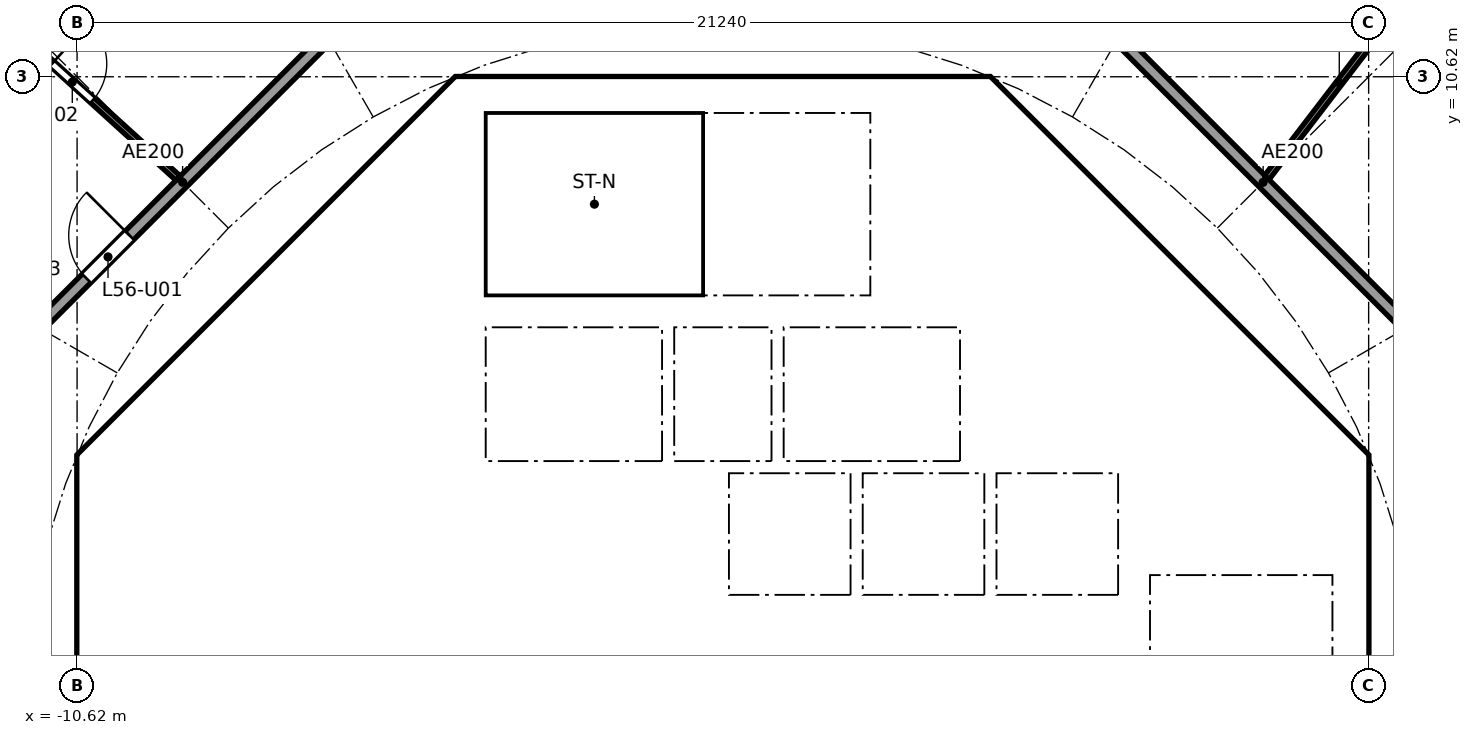
"""IFC4 building model, lengths in metres.
Left out: names, types, materials, properties, quantities, classifications, styles, units other than length and angle.
Written with IfcOpenShell. Run it as: python <this file> out.ifc"""

import sys

from ifc_helpers import new_model, si_unit, direction, frame, frame_2d, origin, place, context, subcontext, project, spatial, polyline, rectangle, outline, extrude, element, fill, save


model = new_model("IFC4")
c1 = context("Model", 3, precision=1e-05, world=origin(), true_north=direction((0.0, 1.0)))
c2 = subcontext(c1, "Body", "Model", "MODEL_VIEW")
j1 = project(units=[si_unit("LENGTHUNIT", "METRE"), si_unit("PLANEANGLEUNIT", "RADIAN")], contexts=[c1])
p1 = place(None, origin())
s1 = spatial("IfcSite", under=j1, at=p1, CompositionType="ELEMENT")
p2 = place(p1, origin())
s2 = spatial("IfcBuilding", under=s1, at=p2, CompositionType="ELEMENT")
p3 = place(p2, frame((0.0, 0.0, 223.3)))
s3 = spatial("IfcBuildingStorey", under=s2, at=p3, CompositionType="ELEMENT", Elevation=223.3)
p4 = place(p3, frame((9.988, 4.613, 0.0), z_axis=(0.0, 0.0, 1.0), x_axis=(-0.707106781187, 0.707106781187, 0.0)))
e1 = element("IfcWall", 1, at=p4, inside=s3, PredefinedType="SHEAR", context=c2, shape_type="SweptSolid", body=[
    extrude(rectangle(XDim=7.602, YDim=0.6, at=frame_2d((3.801, 0.0))), origin(), (0.0, 0.0, 1.0), 3.44),
])
p5 = place(p4, frame((3.201, 0.0, 0.0)))
e2 = element("IfcOpeningElement", 2, at=p5, cuts=e1, PredefinedType="OPENING", context=c2, shape_type="SweptSolid", body=[
    extrude(rectangle(XDim=1.2, YDim=2.1, at=frame_2d((0.6, 1.05))), frame((0.0, 0.31, 0.0), z_axis=(0.0, -1.0, 0.0), x_axis=(1.0, 0.0, 0.0)), (0.0, 0.0, 1.0), 0.62),
])
p6 = place(p3, frame((-4.613, 9.988, 0.0), z_axis=(0.0, 0.0, 1.0), x_axis=(-0.707106781187, -0.707106781187, 0.0)))
e3 = element("IfcWall", 3, at=p6, inside=s3, PredefinedType="SHEAR", context=c2, shape_type="SweptSolid", body=[
    extrude(rectangle(XDim=7.602, YDim=0.6, at=frame_2d((3.801, 0.0))), origin(), (0.0, 0.0, 1.0), 3.44),
])
p7 = place(p6, frame((0.351, 0.0, 0.0)))
e4 = element("IfcOpeningElement", 4, at=p7, cuts=e3, PredefinedType="OPENING", context=c2, shape_type="SweptSolid", body=[
    extrude(rectangle(XDim=1.1, YDim=2.1, at=frame_2d((0.55, 1.05))), frame((0.0, 0.31, 0.0), z_axis=(0.0, -1.0, 0.0), x_axis=(1.0, 0.0, 0.0)), (0.0, 0.0, 1.0), 0.62),
])
p8 = place(p3, frame((-10.325, 3.801, 0.0), z_axis=(0.0, 0.0, 1.0), x_axis=(0.0, -1.0, 0.0)))
e5 = element("IfcWall", 5, at=p8, inside=s3, PredefinedType="SHEAR", context=c2, shape_type="SweptSolid", body=[
    extrude(rectangle(XDim=7.602, YDim=0.6, at=frame_2d((3.801, 0.0))), origin(), (0.0, 0.0, 1.0), 3.44),
])
p9 = place(p8, frame((0.651, 0.0, 0.0)))
e6 = element("IfcOpeningElement", 6, at=p9, cuts=e5, PredefinedType="OPENING", context=c2, shape_type="SweptSolid", body=[
    extrude(rectangle(XDim=1.5, YDim=2.1, at=frame_2d((0.75, 1.05))), frame((0.0, 0.31, 0.0), z_axis=(0.0, -1.0, 0.0), x_axis=(1.0, 0.0, 0.0)), (0.0, 0.0, 1.0), 0.62),
])
p10 = place(p8, frame((5.451, 0.0, 0.0)))
e7 = element("IfcOpeningElement", 7, at=p10, cuts=e5, PredefinedType="OPENING", context=c2, shape_type="SweptSolid", body=[
    extrude(rectangle(XDim=1.5, YDim=2.1, at=frame_2d((0.75, 1.05))), frame((0.0, 0.31, 0.0), z_axis=(0.0, -1.0, 0.0), x_axis=(1.0, 0.0, 0.0)), (0.0, 0.0, 1.0), 0.62),
])
p11 = place(p3, frame((-6.2, 4.3, 0.0), z_axis=(0.0, 0.0, 1.0), x_axis=(0.0, 1.0, 0.0)))
e8 = element("IfcWall", 8, at=p11, inside=s3, PredefinedType="PARTITIONING", context=c2, shape_type="SweptSolid", body=[
    extrude(rectangle(XDim=3.527, YDim=0.15, at=frame_2d((1.763, 0.0))), origin(), (0.0, 0.0, 1.0), 3.44),
])
p12 = place(p11, frame((0.262, 0.0, 0.0)))
e9 = element("IfcOpeningElement", 9, at=p12, cuts=e8, PredefinedType="OPENING", context=c2, shape_type="SweptSolid", body=[
    extrude(rectangle(XDim=0.9, YDim=2.1, at=frame_2d((0.45, 1.05))), frame((0.0, 0.085, 0.0), z_axis=(0.0, -1.0, 0.0), x_axis=(1.0, 0.0, 0.0)), (0.0, 0.0, 1.0), 0.17),
])
p13 = place(p11, frame((2.138, 0.0, 0.0)))
e10 = element("IfcOpeningElement", 10, at=p13, cuts=e8, PredefinedType="OPENING", context=c2, shape_type="SweptSolid", body=[
    extrude(rectangle(XDim=0.9, YDim=2.1, at=frame_2d((0.45, 1.05))), frame((0.0, 0.085, 0.0), z_axis=(0.0, -1.0, 0.0), x_axis=(1.0, 0.0, 0.0)), (0.0, 0.0, 1.0), 0.17),
])
p14 = place(p3, frame((4.0, 4.3, 0.0), z_axis=(0.0, 0.0, 1.0), x_axis=(0.0, 1.0, 0.0)))
e11 = element("IfcWall", 11, at=p14, inside=s3, PredefinedType="SOLIDWALL", context=c2, shape_type="SweptSolid", body=[
    extrude(rectangle(XDim=2.2, YDim=0.2, at=frame_2d((1.1, 0.0))), origin(), (0.0, 0.0, 1.0), 3.44),
])
p15 = place(p14, frame((0.55, 0.0, 0.0)))
e12 = element("IfcOpeningElement", 12, at=p15, cuts=e11, PredefinedType="OPENING", context=c2, shape_type="SweptSolid", body=[
    extrude(rectangle(XDim=1.1, YDim=2.1, at=frame_2d((0.55, 1.05))), frame((0.0, 0.11, 0.0), z_axis=(0.0, -1.0, 0.0), x_axis=(1.0, 0.0, 0.0)), (0.0, 0.0, 1.0), 0.22),
])
p16 = place(p3, frame((-4.0, 4.3, 0.0), z_axis=(0.0, 0.0, 1.0), x_axis=(0.0, 1.0, 0.0)))
e13 = element("IfcWall", 13, at=p16, inside=s3, PredefinedType="SOLIDWALL", context=c2, shape_type="SweptSolid", body=[
    extrude(rectangle(XDim=2.2, YDim=0.2, at=frame_2d((1.1, 0.0))), origin(), (0.0, 0.0, 1.0), 3.44),
])
p17 = place(p16, frame((0.55, 0.0, 0.0)))
e14 = element("IfcOpeningElement", 14, at=p17, cuts=e13, PredefinedType="OPENING", context=c2, shape_type="SweptSolid", body=[
    extrude(rectangle(XDim=1.1, YDim=2.1, at=frame_2d((0.55, 1.05))), frame((0.0, 0.11, 0.0), z_axis=(0.0, -1.0, 0.0), x_axis=(1.0, 0.0, 0.0)), (0.0, 0.0, 1.0), 0.22),
])
p18 = place(p3, frame((-6.7, 2.0, 0.0), z_axis=(0.0, 0.0, 1.0), x_axis=(1.0, 0.0, 0.0)))
e15 = element("IfcWall", 15, at=p18, inside=s3, PredefinedType="SOLIDWALL", context=c2, shape_type="SweptSolid", body=[
    extrude(rectangle(XDim=13.4, YDim=0.2, at=frame_2d((6.7, 0.0))), origin(), (0.0, 0.0, 1.0), 3.44),
])
p19 = place(p18, frame((7.25, 0.0, 0.0)))
e16 = element("IfcOpeningElement", 16, at=p19, cuts=e15, PredefinedType="OPENING", context=c2, shape_type="SweptSolid", body=[
    extrude(rectangle(XDim=1.1, YDim=2.1, at=frame_2d((0.55, 1.05))), frame((0.0, 0.11, 0.0), z_axis=(0.0, -1.0, 0.0), x_axis=(1.0, 0.0, 0.0)), (0.0, 0.0, 1.0), 0.22),
])
p20 = place(p18, frame((9.45, 0.0, 0.0)))
e17 = element("IfcOpeningElement", 17, at=p20, cuts=e15, PredefinedType="OPENING", context=c2, shape_type="SweptSolid", body=[
    extrude(rectangle(XDim=1.1, YDim=2.1, at=frame_2d((0.55, 1.05))), frame((0.0, 0.11, 0.0), z_axis=(0.0, -1.0, 0.0), x_axis=(1.0, 0.0, 0.0)), (0.0, 0.0, 1.0), 0.22),
])
p21 = place(p18, frame((1.85, 0.0, 0.0)))
e18 = element("IfcOpeningElement", 18, at=p21, cuts=e15, PredefinedType="OPENING", context=c2, shape_type="SweptSolid", body=[
    extrude(rectangle(XDim=0.9, YDim=2.1, at=frame_2d((0.45, 1.05))), frame((0.0, 0.11, 0.0), z_axis=(0.0, -1.0, 0.0), x_axis=(1.0, 0.0, 0.0)), (0.0, 0.0, 1.0), 0.22),
])
p22 = place(p18, frame((5.15, 0.0, 0.0)))
e19 = element("IfcOpeningElement", 19, at=p22, cuts=e15, PredefinedType="OPENING", context=c2, shape_type="SweptSolid", body=[
    extrude(rectangle(XDim=0.9, YDim=2.1, at=frame_2d((0.45, 1.05))), frame((0.0, 0.11, 0.0), z_axis=(0.0, -1.0, 0.0), x_axis=(1.0, 0.0, 0.0)), (0.0, 0.0, 1.0), 0.22),
])
p23 = place(p3, frame((6.7, 4.0, 0.0), z_axis=(0.0, 0.0, 1.0), x_axis=(1.0, 0.0, 0.0)))
e20 = element("IfcWall", 20, at=p23, inside=s3, PredefinedType="SOLIDWALL", context=c2, shape_type="SweptSolid", body=[
    extrude(rectangle(XDim=3.325, YDim=0.2, at=frame_2d((1.662, 0.0))), origin(), (0.0, 0.0, 1.0), 3.44),
])
p24 = place(p23, frame((1.25, 0.0, 0.0)))
e21 = element("IfcOpeningElement", 21, at=p24, cuts=e20, PredefinedType="OPENING", context=c2, shape_type="SweptSolid", body=[
    extrude(rectangle(XDim=1.1, YDim=2.1, at=frame_2d((0.55, 1.05))), frame((0.0, 0.11, 0.0), z_axis=(0.0, -1.0, 0.0), x_axis=(1.0, 0.0, 0.0)), (0.0, 0.0, 1.0), 0.22),
])
p25 = place(p3, frame((4.0, 7.025, 0.0), z_axis=(0.0, 0.0, 1.0), x_axis=(0.0, 1.0, 0.0)))
e22 = element("IfcWall", 22, at=p25, inside=s3, PredefinedType="SOLIDWALL", context=c2, shape_type="SweptSolid", body=[
    extrude(rectangle(XDim=3.0, YDim=0.2, at=frame_2d((1.5, 0.0))), origin(), (0.0, 0.0, 1.0), 3.44),
])
p26 = place(p25, frame((0.925, 0.0, 0.0)))
e23 = element("IfcOpeningElement", 23, at=p26, cuts=e22, PredefinedType="OPENING", context=c2, shape_type="SweptSolid", body=[
    extrude(rectangle(XDim=1.1, YDim=2.1, at=frame_2d((0.55, 1.05))), frame((0.0, 0.11, 0.0), z_axis=(0.0, -1.0, 0.0), x_axis=(1.0, 0.0, 0.0)), (0.0, 0.0, 1.0), 0.22),
])
p27 = place(p3, origin())
e24 = element("IfcWall", 24, at=p27, inside=s3, PredefinedType="SHEAR", context=c2, shape_type="SweptSolid", body=[
    extrude(outline(polyline([(-10.2, 4.825), (-9.776, 4.401), (-10.025, 4.152), (-10.025, 3.801), (-10.625, 3.801), (-10.625, 4.401), (-10.2, 4.825)])), origin(), (0.0, 0.0, 1.0), 3.44),
])
p28 = place(p3, origin())
e25 = element("IfcWall", 25, at=p28, inside=s3, PredefinedType="SHEAR", context=c2, shape_type="SweptSolid", body=[
    extrude(outline(polyline([(-4.152, 10.025), (-4.401, 9.776), (-4.825, 10.2), (-4.401, 10.625), (4.401, 10.625), (4.825, 10.2), (4.401, 9.776), (4.152, 10.025), (-4.152, 10.025)])), origin(), (0.0, 0.0, 1.0), 3.44),
])
p29 = place(p3, origin())
e26 = element("IfcWall", 26, at=p29, inside=s3, PredefinedType="SHEAR", context=c2, shape_type="SweptSolid", body=[
    extrude(outline(polyline([(9.776, -4.401), (10.025, -4.152), (10.025, -3.801), (10.025, 4.152), (9.776, 4.401), (10.2, 4.825), (10.625, 4.401), (10.625, -4.401), (10.2, -4.825), (9.776, -4.401)])), origin(), (0.0, 0.0, 1.0), 3.44),
])
p30 = place(p3, frame((-10.025, 4.0, 0.0), z_axis=(0.0, 0.0, 1.0), x_axis=(1.0, 0.0, 0.0)))
e27 = element("IfcWall", 27, at=p30, inside=s3, PredefinedType="PARTITIONING", context=c2, shape_type="SweptSolid", body=[
    extrude(rectangle(XDim=3.325, YDim=0.2, at=frame_2d((1.662, 0.0))), origin(), (0.0, 0.0, 1.0), 3.44),
])
p31 = place(p3, frame((-8.301, 5.8, 0.0), z_axis=(0.0, 0.0, 1.0), x_axis=(1.0, 0.0, 0.0)))
e28 = element("IfcWall", 28, at=p31, inside=s3, PredefinedType="PARTITIONING", context=c2, shape_type="SweptSolid", body=[
    extrude(rectangle(XDim=2.026, YDim=0.15, at=frame_2d((1.013, 0.0))), origin(), (0.0, 0.0, 1.0), 3.44),
])
for number, where, z_axis, x_axis in (
    (29, (-0.9, 4.3, 0.0), (0.0, 0.0, 1.0), (0.0, 1.0, 0.0)),
    (30, (0.9, 4.3, 0.0), (0.0, 0.0, 1.0), (0.0, 1.0, 0.0)),
):
    element("IfcWall", number, at=place(p3, frame(where, z_axis=z_axis, x_axis=x_axis)), inside=s3, PredefinedType="SOLIDWALL", context=c2, shape_type="SweptSolid", body=[
        extrude(rectangle(XDim=2.2, YDim=0.2, at=frame_2d((1.1, 0.0))), origin(), (0.0, 0.0, 1.0), 3.44),
    ])
p32 = place(p3, origin())
e31 = element("IfcWall", 31, at=p32, inside=s3, PredefinedType="SOLIDWALL", context=c2, shape_type="SweptSolid", body=[
    extrude(outline(polyline([(-6.7, 4.3), (6.7, 4.3), (6.7, 2.1), (6.5, 2.1), (6.5, 4.1), (4.5, 4.1), (4.5, 2.1), (4.3, 2.1), (4.3, 4.1), (2.3, 4.1), (2.3, 2.1), (2.1, 2.1), (2.1, 4.1), (0.1, 4.1), (0.1, 2.1), (-0.1, 2.1), (-0.1, 4.1), (-2.1, 4.1), (-2.1, 2.1), (-2.3, 2.1), (-2.3, 4.1), (-6.5, 4.1), (-6.5, 2.1), (-6.7, 2.1), (-6.7, 4.3)])), origin(), (0.0, 0.0, 1.0), 3.44),
])
p33 = place(p3, origin())
e32 = element("IfcWall", 32, at=p33, inside=s3, PredefinedType="SOLIDWALL", context=c2, shape_type="SweptSolid", body=[
    extrude(outline(polyline([(-3.9, 7.025), (-4.1, 7.025), (-4.1, 10.025), (-3.9, 10.025), (-3.9, 7.025)])), origin(), (0.0, 0.0, 1.0), 3.44),
])
p34 = place(p3, origin())
e33 = element("IfcWall", 33, at=p34, inside=s3, PredefinedType="SOLIDWALL", context=c2, shape_type="SweptSolid", body=[
    extrude(outline(polyline([(4.1, 6.5), (-4.1, 6.5), (-4.1, 7.025), (4.1, 7.025), (4.1, 6.5)])), origin(), (0.0, 0.0, 1.0), 3.44),
])
p35 = place(p3, origin())
e34 = element("IfcWall", 34, at=p35, inside=s3, PredefinedType="SOLIDWALL", context=c2, shape_type="SweptSolid", body=[
    extrude(outline(polyline([(7.025, -3.9), (6.7, -3.9), (6.7, 3.9), (7.025, 3.9), (7.025, -3.9)])), origin(), (0.0, 0.0, 1.0), 3.44),
])
p36 = place(p3, frame((12.635, 5.134, 0.0), z_axis=(0.0, 0.0, 1.0), x_axis=(-0.707106781187, 0.707106781187, 0.0)))
e35 = element("IfcWall", 35, at=p36, inside=s3, PredefinedType="PARTITIONING", context=c2, shape_type="SweptSolid", body=[
    extrude(rectangle(XDim=10.609, YDim=0.2, at=frame_2d((5.305, 0.0))), origin(), (0.0, 0.0, 1.0), 3.44),
])
p37 = place(p3, frame((-5.275, 12.494, 0.0), z_axis=(0.0, 0.0, 1.0), x_axis=(-0.707106781187, -0.707106781187, 0.0)))
e36 = element("IfcWall", 36, at=p37, inside=s3, PredefinedType="PARTITIONING", context=c2, shape_type="SweptSolid", body=[
    extrude(rectangle(XDim=10.209, YDim=0.2, at=frame_2d((5.104, 0.0))), origin(), (0.0, 0.0, 1.0), 3.44),
])
p38 = place(p37, frame((6.339, 0.0, 0.0)))
e37 = element("IfcOpeningElement", 37, at=p38, cuts=e36, PredefinedType="OPENING", context=c2, shape_type="SweptSolid", body=[
    extrude(rectangle(XDim=1.0, YDim=2.1, at=frame_2d((0.5, 1.05))), frame((0.0, 0.11, 0.0), z_axis=(0.0, -1.0, 0.0), x_axis=(1.0, 0.0, 0.0)), (0.0, 0.0, 1.0), 0.22),
])
p39 = place(p3, frame((12.759, 10.443, 0.0), z_axis=(0.0, 0.0, 1.0), x_axis=(-0.642225196965, 0.766516011825, 0.0)))
e38 = element("IfcWall", 38, at=p39, inside=s3, PredefinedType="PARTITIONING", context=c2, shape_type="SweptSolid", body=[
    extrude(rectangle(XDim=4.361, YDim=0.1, at=frame_2d((2.18, 0.0))), origin(), (0.0, 0.0, 1.0), 2.837),
])
p40 = place(p3, frame((8.946, 8.964, 0.0), z_axis=(0.0, 0.0, 1.0), x_axis=(0.608213063121, 0.793773815296, 0.0)))
e39 = element("IfcWall", 39, at=p40, inside=s3, PredefinedType="PARTITIONING", context=c2, shape_type="SweptSolid", body=[
    extrude(rectangle(XDim=3.918, YDim=0.1, at=frame_2d((1.959, 0.0))), origin(), (0.0, 0.0, 1.0), 2.762),
])
p41 = place(p3, frame((-8.959, 8.952, 0.0), z_axis=(0.0, 0.0, 1.0), x_axis=(-0.740140081805, 0.672452719011, 0.0)))
e40 = element("IfcWall", 40, at=p41, inside=s3, PredefinedType="PARTITIONING", context=c2, shape_type="SweptSolid", body=[
    extrude(rectangle(XDim=9.775, YDim=0.1, at=frame_2d((4.887, 0.0))), origin(), (0.0, 0.0, 1.0), 2.762),
])
p42 = place(p41, frame((1.901, 0.0, 0.0)))
e41 = element("IfcOpeningElement", 41, at=p42, cuts=e40, PredefinedType="OPENING", context=c2, shape_type="SweptSolid", body=[
    extrude(rectangle(XDim=0.9, YDim=2.1, at=frame_2d((0.45, 1.05))), frame((0.0, 0.06, 0.0), z_axis=(0.0, -1.0, 0.0), x_axis=(1.0, 0.0, 0.0)), (0.0, 0.0, 1.0), 0.12),
])
p43 = place(p41, frame((6.789, 0.0, 0.0)))
e42 = element("IfcOpeningElement", 42, at=p43, cuts=e40, PredefinedType="OPENING", context=c2, shape_type="SweptSolid", body=[
    extrude(rectangle(XDim=0.9, YDim=2.1, at=frame_2d((0.45, 1.05))), frame((0.0, 0.06, 0.0), z_axis=(0.0, -1.0, 0.0), x_axis=(1.0, 0.0, 0.0)), (0.0, 0.0, 1.0), 0.12),
])
p44 = place(p19, origin())
e43 = element("IfcDoor", 43, at=p44, inside=s3, OperationType="DOUBLE_DOOR_SLIDING", PredefinedType="DOOR", context=c2, shape_type="SweptSolid", body=[
    extrude(rectangle(XDim=1.1, YDim=2.1, at=frame_2d((0.55, 1.05))), frame((0.0, 0.025, 0.0), z_axis=(0.0, -1.0, 0.0), x_axis=(1.0, 0.0, 0.0)), (0.0, 0.0, 1.0), 0.05),
])
fill(e16, e43)
p45 = place(p20, origin())
e44 = element("IfcDoor", 44, at=p45, inside=s3, OperationType="DOUBLE_DOOR_SLIDING", PredefinedType="DOOR", context=c2, shape_type="SweptSolid", body=[
    extrude(rectangle(XDim=1.1, YDim=2.1, at=frame_2d((0.55, 1.05))), frame((0.0, 0.025, 0.0), z_axis=(0.0, -1.0, 0.0), x_axis=(1.0, 0.0, 0.0)), (0.0, 0.0, 1.0), 0.05),
])
fill(e17, e44)
p46 = place(p15, origin())
e45 = element("IfcDoor", 45, at=p46, inside=s3, OperationType="DOUBLE_DOOR_SLIDING", PredefinedType="DOOR", context=c2, shape_type="SweptSolid", body=[
    extrude(rectangle(XDim=1.1, YDim=2.1, at=frame_2d((0.55, 1.05))), frame((0.0, 0.025, 0.0), z_axis=(0.0, -1.0, 0.0), x_axis=(1.0, 0.0, 0.0)), (0.0, 0.0, 1.0), 0.05),
])
fill(e12, e45)
p47 = place(p17, origin())
e46 = element("IfcDoor", 46, at=p47, inside=s3, OperationType="DOUBLE_DOOR_SLIDING", PredefinedType="DOOR", context=c2, shape_type="SweptSolid", body=[
    extrude(rectangle(XDim=1.1, YDim=2.1, at=frame_2d((0.55, 1.05))), frame((0.0, 0.025, 0.0), z_axis=(0.0, -1.0, 0.0), x_axis=(1.0, 0.0, 0.0)), (0.0, 0.0, 1.0), 0.05),
])
fill(e14, e46)
p48 = place(p24, frame((1.1, 0.0, 0.0), x_axis=(-1.0, 0.0, 0.0)))
e47 = element("IfcDoor", 47, at=p48, inside=s3, OperationType="SINGLE_SWING_RIGHT", PredefinedType="DOOR", context=c2, shape_type="SweptSolid", body=[
    extrude(rectangle(XDim=1.1, YDim=2.1, at=frame_2d((0.55, 1.05))), frame((0.0, 0.025, 0.0), z_axis=(0.0, -1.0, 0.0), x_axis=(1.0, 0.0, 0.0)), (0.0, 0.0, 1.0), 0.05),
])
fill(e21, e47)
p49 = place(p26, origin())
e48 = element("IfcDoor", 48, at=p49, inside=s3, OperationType="SINGLE_SWING_LEFT", PredefinedType="DOOR", context=c2, shape_type="SweptSolid", body=[
    extrude(rectangle(XDim=1.1, YDim=2.1, at=frame_2d((0.55, 1.05))), frame((0.0, 0.025, 0.0), z_axis=(0.0, -1.0, 0.0), x_axis=(1.0, 0.0, 0.0)), (0.0, 0.0, 1.0), 0.05),
])
fill(e23, e48)
p50 = place(p12, origin())
e49 = element("IfcDoor", 49, at=p50, inside=s3, OperationType="SINGLE_SWING_RIGHT", PredefinedType="DOOR", context=c2, shape_type="SweptSolid", body=[
    extrude(rectangle(XDim=0.9, YDim=2.1, at=frame_2d((0.45, 1.05))), frame((0.0, 0.025, 0.0), z_axis=(0.0, -1.0, 0.0), x_axis=(1.0, 0.0, 0.0)), (0.0, 0.0, 1.0), 0.05),
])
fill(e9, e49)
p51 = place(p13, origin())
e50 = element("IfcDoor", 50, at=p51, inside=s3, OperationType="SINGLE_SWING_RIGHT", PredefinedType="DOOR", context=c2, shape_type="SweptSolid", body=[
    extrude(rectangle(XDim=0.9, YDim=2.1, at=frame_2d((0.45, 1.05))), frame((0.0, 0.025, 0.0), z_axis=(0.0, -1.0, 0.0), x_axis=(1.0, 0.0, 0.0)), (0.0, 0.0, 1.0), 0.05),
])
fill(e10, e50)
p52 = place(p21, origin())
e51 = element("IfcDoor", 51, at=p52, inside=s3, OperationType="SINGLE_SWING_LEFT", PredefinedType="DOOR", context=c2, shape_type="SweptSolid", body=[
    extrude(rectangle(XDim=0.9, YDim=2.1, at=frame_2d((0.45, 1.05))), frame((0.0, 0.025, 0.0), z_axis=(0.0, -1.0, 0.0), x_axis=(1.0, 0.0, 0.0)), (0.0, 0.0, 1.0), 0.05),
])
fill(e18, e51)
p53 = place(p22, origin())
e52 = element("IfcDoor", 52, at=p53, inside=s3, OperationType="SINGLE_SWING_LEFT", PredefinedType="DOOR", context=c2, shape_type="SweptSolid", body=[
    extrude(rectangle(XDim=0.9, YDim=2.1, at=frame_2d((0.45, 1.05))), frame((0.0, 0.025, 0.0), z_axis=(0.0, -1.0, 0.0), x_axis=(1.0, 0.0, 0.0)), (0.0, 0.0, 1.0), 0.05),
])
fill(e19, e52)
p54 = place(p5, origin())
e53 = element("IfcDoor", 53, at=p54, inside=s3, OperationType="SINGLE_SWING_LEFT", PredefinedType="DOOR", context=c2, shape_type="SweptSolid", body=[
    extrude(rectangle(XDim=1.2, YDim=2.1, at=frame_2d((0.6, 1.05))), frame((0.0, 0.025, 0.0), z_axis=(0.0, -1.0, 0.0), x_axis=(1.0, 0.0, 0.0)), (0.0, 0.0, 1.0), 0.05),
])
fill(e2, e53)
p55 = place(p9, origin())
e54 = element("IfcDoor", 54, at=p55, inside=s3, OperationType="DOUBLE_DOOR_SINGLE_SWING", PredefinedType="DOOR", context=c2, shape_type="SweptSolid", body=[
    extrude(rectangle(XDim=1.5, YDim=2.1, at=frame_2d((0.75, 1.05))), frame((0.0, 0.025, 0.0), z_axis=(0.0, -1.0, 0.0), x_axis=(1.0, 0.0, 0.0)), (0.0, 0.0, 1.0), 0.05),
])
fill(e6, e54)
p56 = place(p7, origin())
e55 = element("IfcDoor", 55, at=p56, inside=s3, OperationType="SINGLE_SWING_LEFT", PredefinedType="DOOR", context=c2, shape_type="SweptSolid", body=[
    extrude(rectangle(XDim=1.1, YDim=2.1, at=frame_2d((0.55, 1.05))), frame((0.0, 0.025, 0.0), z_axis=(0.0, -1.0, 0.0), x_axis=(1.0, 0.0, 0.0)), (0.0, 0.0, 1.0), 0.05),
])
fill(e4, e55)
p57 = place(p38, frame((1.0, 0.0, 0.0), x_axis=(-1.0, 0.0, 0.0)))
e56 = element("IfcDoor", 56, at=p57, inside=s3, OperationType="SINGLE_SWING_RIGHT", PredefinedType="DOOR", context=c2, shape_type="SweptSolid", body=[
    extrude(rectangle(XDim=1.0, YDim=2.1, at=frame_2d((0.5, 1.05))), frame((0.0, 0.025, 0.0), z_axis=(0.0, -1.0, 0.0), x_axis=(1.0, 0.0, 0.0)), (0.0, 0.0, 1.0), 0.05),
])
fill(e37, e56)
p58 = place(p42, frame((0.9, 0.0, 0.0), x_axis=(-1.0, 0.0, 0.0)))
e57 = element("IfcDoor", 57, at=p58, inside=s3, OperationType="SINGLE_SWING_LEFT", PredefinedType="DOOR", context=c2, shape_type="SweptSolid", body=[
    extrude(rectangle(XDim=0.9, YDim=2.1, at=frame_2d((0.45, 1.05))), frame((0.0, 0.025, 0.0), z_axis=(0.0, -1.0, 0.0), x_axis=(1.0, 0.0, 0.0)), (0.0, 0.0, 1.0), 0.05),
])
fill(e41, e57)
save(model, sys.argv[1])
